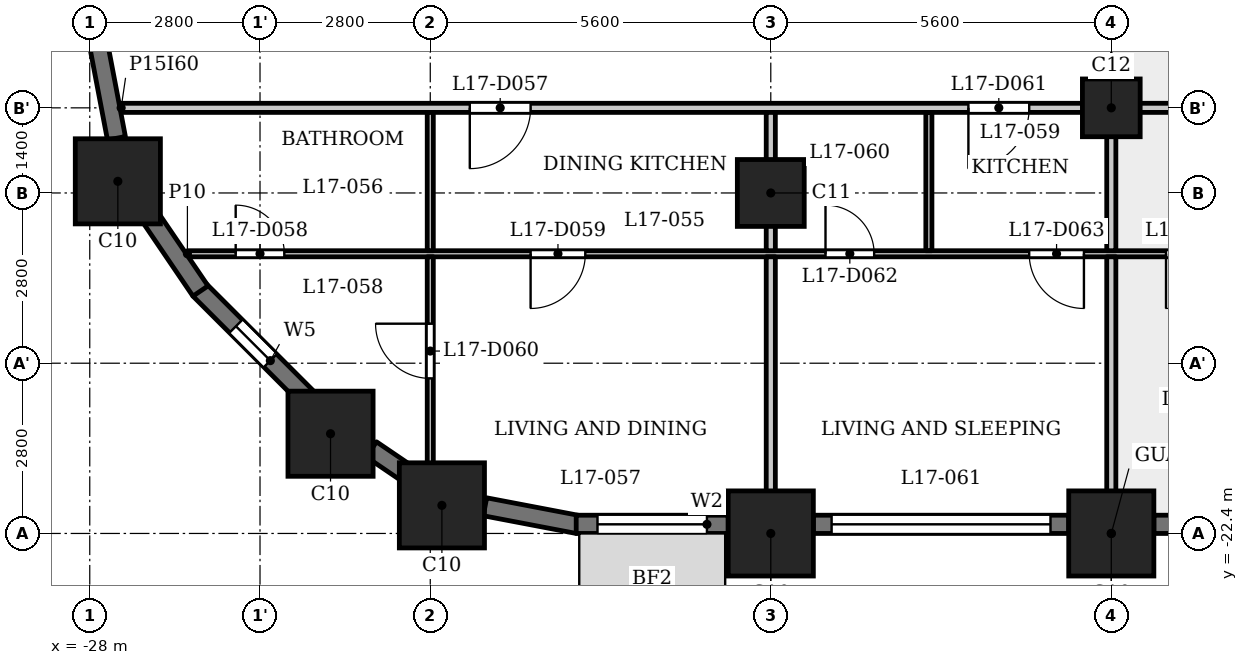
"""IFC4 building model, lengths in metres.
Left out: names, types, materials, properties, quantities, classifications, styles, units other than length and angle.
Written with IfcOpenShell. Run it as: python <this file> out.ifc"""

import sys

from ifc_helpers import new_model, si_unit, direction, frame, frame_2d, origin, origin_2d, place, context, subcontext, project, spatial, rectangle, extrude, element, fill, save


model = new_model("IFC4")
c1 = context("Model", 3, precision=1e-05, world=origin(), true_north=direction((0.0, 1.0)))
c2 = subcontext(c1, "Body", "Model", "MODEL_VIEW")
j1 = project(units=[si_unit("LENGTHUNIT", "METRE"), si_unit("PLANEANGLEUNIT", "RADIAN")], contexts=[c1])
p1 = place(None, origin())
s1 = spatial("IfcSite", under=j1, at=p1, CompositionType="ELEMENT")
p2 = place(p1, origin())
s2 = spatial("IfcBuilding", under=s1, at=p2, CompositionType="ELEMENT")
p3 = place(p2, frame((0.0, 0.0, 69.0)))
s3 = spatial("IfcBuildingStorey", under=s2, at=p3, CompositionType="ELEMENT", Elevation=69.0)
for number, where, z_axis, x_axis in (
    (1, (-22.209, -21.938, 0.0), (0.0, 0.0, 1.0), (1.0, 0.0, 0.0)),
    (2, (-16.8, -22.4, 0.0), (0.0, 0.0, 1.0), (1.0, 0.0, 0.0)),
    (3, (-11.2, -22.4, 0.0), (0.0, 0.0, 1.0), (1.0, 0.0, 0.0)),
    (4, (-27.538, -16.609, 0.0), (0.0, 0.0, 1.0), (1.0, 0.0, 0.0)),
    (5, (-24.04, -20.76, 0.0), (0.0, 0.0, 1.0), (1.0, 0.0, 0.0)),
):
    element("IfcColumn", number, at=place(p3, frame(where, z_axis=z_axis, x_axis=x_axis)), inside=s3, PredefinedType="COLUMN", context=c2, shape_type="SweptSolid", body=[
        extrude(rectangle(XDim=1.4, YDim=1.4, at=origin_2d()), origin(), (0.0, 0.0, 1.0), 3.5),
    ])
p4 = place(p3, frame((-16.8, -16.8, 0.0), z_axis=(0.0, 0.0, 1.0), x_axis=(1.0, 0.0, 0.0)))
e6 = element("IfcColumn", 6, at=p4, inside=s3, PredefinedType="COLUMN", context=c2, shape_type="SweptSolid", body=[
    extrude(rectangle(XDim=1.1, YDim=1.1, at=origin_2d()), origin(), (0.0, 0.0, 1.0), 3.5),
])
p5 = place(p3, frame((-11.2, -15.4, 0.0), z_axis=(0.0, 0.0, 1.0), x_axis=(1.0, 0.0, 0.0)))
e7 = element("IfcColumn", 7, at=p5, inside=s3, PredefinedType="COLUMN", context=c2, shape_type="SweptSolid", body=[
    extrude(rectangle(XDim=0.95, YDim=0.95, at=origin_2d()), origin(), (0.0, 0.0, 1.0), 3.5),
])
p6 = place(p3, frame((-26.197, -18.391, 0.0), z_axis=(0.0, 0.0, 1.0), x_axis=(0.707057949532, -0.707155609469, 0.0)))
e8 = element("IfcWall", 8, at=p6, inside=s3, PredefinedType="SOLIDWALL", context=c2, shape_type="SweptSolid", body=[
    extrude(rectangle(XDim=2.5, YDim=0.3, at=frame_2d((1.25, 0.0))), origin(), (0.0, 0.0, 1.0), 2.3),
])
p7 = place(p6, frame((0.85, 0.0, 0.6)))
e9 = element("IfcOpeningElement", 9, at=p7, cuts=e8, PredefinedType="OPENING", context=c2, shape_type="SweptSolid", body=[
    extrude(rectangle(XDim=0.8, YDim=1.55, at=frame_2d((0.4, 0.775))), frame((0.0, 0.16, 0.0), z_axis=(0.0, -1.0, 0.0), x_axis=(1.0, 0.0, 0.0)), (0.0, 0.0, 1.0), 0.32),
])
p8 = place(p3, frame((-23.368, -21.017, 0.0), z_axis=(0.0, 0.0, 1.0), x_axis=(0.827037530089, -0.562146710232, 0.0)))
e10 = element("IfcWall", 10, at=p8, inside=s3, PredefinedType="SOLIDWALL", context=c2, shape_type="SweptSolid", body=[
    extrude(rectangle(XDim=0.777, YDim=0.3, at=frame_2d((0.388, 0.0))), origin(), (0.0, 0.0, 1.0), 3.15),
])
p9 = place(p3, frame((-21.5, -21.961, 0.0), z_axis=(0.0, 0.0, 1.0), x_axis=(0.982297345734, -0.187328386968, 0.0)))
e11 = element("IfcWall", 11, at=p9, inside=s3, PredefinedType="SOLIDWALL", context=c2, shape_type="SweptSolid", body=[
    extrude(rectangle(XDim=1.556, YDim=0.3, at=frame_2d((0.778, 0.0))), origin(), (0.0, 0.0, 1.0), 2.3),
])
p10 = place(p3, frame((-20.0, -22.25, 0.0), z_axis=(0.0, 0.0, 1.0), x_axis=(1.0, 0.0, 0.0)))
e12 = element("IfcWall", 12, at=p10, inside=s3, PredefinedType="SOLIDWALL", context=c2, shape_type="SweptSolid", body=[
    extrude(rectangle(XDim=2.5, YDim=0.3, at=frame_2d((1.25, 0.0))), origin(), (0.0, 0.0, 1.0), 2.3),
])
p11 = place(p10, frame((0.35, 0.0, 0.9)))
e13 = element("IfcOpeningElement", 13, at=p11, cuts=e12, PredefinedType="OPENING", context=c2, shape_type="SweptSolid", body=[
    extrude(rectangle(XDim=1.8, YDim=1.25, at=frame_2d((0.9, 0.625))), frame((0.0, 0.16, 0.0), z_axis=(0.0, -1.0, 0.0), x_axis=(1.0, 0.0, 0.0)), (0.0, 0.0, 1.0), 0.32),
])
p12 = place(p3, frame((-16.1, -22.25, 0.0), z_axis=(0.0, 0.0, 1.0), x_axis=(1.0, 0.0, 0.0)))
e14 = element("IfcWall", 14, at=p12, inside=s3, PredefinedType="SOLIDWALL", context=c2, shape_type="SweptSolid", body=[
    extrude(rectangle(XDim=4.2, YDim=0.3, at=frame_2d((2.1, 0.0))), origin(), (0.0, 0.0, 1.0), 2.3),
])
p13 = place(p12, frame((0.3, 0.0, 1.2)))
e15 = element("IfcOpeningElement", 15, at=p13, cuts=e14, PredefinedType="OPENING", context=c2, shape_type="SweptSolid", body=[
    extrude(rectangle(XDim=3.6, YDim=0.95, at=frame_2d((1.8, 0.475))), frame((0.0, 0.16, 0.0), z_axis=(0.0, -1.0, 0.0), x_axis=(1.0, 0.0, 0.0)), (0.0, 0.0, 1.0), 0.32),
])
p14 = place(p3, frame((-10.5, -22.25, 0.0), z_axis=(0.0, 0.0, 1.0), x_axis=(1.0, 0.0, 0.0)))
e16 = element("IfcWall", 16, at=p14, inside=s3, PredefinedType="SOLIDWALL", context=c2, shape_type="SweptSolid", body=[
    extrude(rectangle(XDim=4.2, YDim=0.3, at=frame_2d((2.1, 0.0))), origin(), (0.0, 0.0, 1.0), 2.3),
])
p15 = place(p14, frame((0.3, 0.0, 1.2)))
e17 = element("IfcOpeningElement", 17, at=p15, cuts=e16, PredefinedType="OPENING", context=c2, shape_type="SweptSolid", body=[
    extrude(rectangle(XDim=3.6, YDim=0.95, at=frame_2d((1.8, 0.475))), frame((0.0, 0.16, 0.0), z_axis=(0.0, -1.0, 0.0), x_axis=(1.0, 0.0, 0.0)), (0.0, 0.0, 1.0), 0.32),
])
for number, where, z_axis, x_axis in (
    (18, (-27.853, -14.372, 0.0), (0.0, 0.0, 1.0), (0.187, -0.982, 0.0)),
    (19, (-27.053, -17.126, 0.0), (0.0, 0.0, 1.0), (0.562, -0.827, 0.0)),
):
    element("IfcWall", number, at=place(p3, frame(where, z_axis=z_axis, x_axis=x_axis)), inside=s3, PredefinedType="SOLIDWALL", context=c2, shape_type="SweptSolid", body=[
        extrude(rectangle(XDim=1.556, YDim=0.3, at=frame_2d((0.778, 0.0))), origin(), (0.0, 0.0, 1.0), 2.3),
    ])
p16 = place(p3, frame((-26.394, -17.8, 0.0), z_axis=(0.0, 0.0, 1.0), x_axis=(1.0, 0.0, 0.0)))
e20 = element("IfcWall", 20, at=p16, inside=s3, PredefinedType="PARTITIONING", context=c2, shape_type="SweptSolid", body=[
    extrude(rectangle(XDim=53.034, YDim=0.1, at=frame_2d((26.517, 0.0))), origin(), (0.0, 0.0, 1.0), 3.15),
])
p17 = place(p16, frame((0.794, 0.0, 0.0)))
e21 = element("IfcOpeningElement", 21, at=p17, cuts=e20, PredefinedType="OPENING", context=c2, shape_type="SweptSolid", body=[
    extrude(rectangle(XDim=0.8, YDim=2.1, at=frame_2d((0.4, 1.05))), frame((0.0, 0.06, 0.0), z_axis=(0.0, -1.0, 0.0), x_axis=(1.0, 0.0, 0.0)), (0.0, 0.0, 1.0), 0.12),
])
p18 = place(p16, frame((5.644, 0.0, 0.0)))
e22 = element("IfcOpeningElement", 22, at=p18, cuts=e20, PredefinedType="OPENING", context=c2, shape_type="SweptSolid", body=[
    extrude(rectangle(XDim=0.9, YDim=2.1, at=frame_2d((0.45, 1.05))), frame((0.0, 0.06, 0.0), z_axis=(0.0, -1.0, 0.0), x_axis=(1.0, 0.0, 0.0)), (0.0, 0.0, 1.0), 0.12),
])
p19 = place(p16, frame((10.494, 0.0, 0.0)))
e23 = element("IfcOpeningElement", 23, at=p19, cuts=e20, PredefinedType="OPENING", context=c2, shape_type="SweptSolid", body=[
    extrude(rectangle(XDim=0.8, YDim=2.1, at=frame_2d((0.4, 1.05))), frame((0.0, 0.06, 0.0), z_axis=(0.0, -1.0, 0.0), x_axis=(1.0, 0.0, 0.0)), (0.0, 0.0, 1.0), 0.12),
])
p20 = place(p16, frame((13.844, 0.0, 0.0)))
e24 = element("IfcOpeningElement", 24, at=p20, cuts=e20, PredefinedType="OPENING", context=c2, shape_type="SweptSolid", body=[
    extrude(rectangle(XDim=0.9, YDim=2.1, at=frame_2d((0.45, 1.05))), frame((0.0, 0.06, 0.0), z_axis=(0.0, -1.0, 0.0), x_axis=(1.0, 0.0, 0.0)), (0.0, 0.0, 1.0), 0.12),
])
p21 = place(p16, frame((19.344, 0.0, 0.0)))
e25 = element("IfcOpeningElement", 25, at=p21, cuts=e20, PredefinedType="OPENING", context=c2, shape_type="SweptSolid", body=[
    extrude(rectangle(XDim=0.8, YDim=2.1, at=frame_2d((0.4, 1.05))), frame((0.0, 0.06, 0.0), z_axis=(0.0, -1.0, 0.0), x_axis=(1.0, 0.0, 0.0)), (0.0, 0.0, 1.0), 0.12),
])
p22 = place(p16, frame((16.094, 0.0, 0.0)))
e26 = element("IfcOpeningElement", 26, at=p22, cuts=e20, PredefinedType="OPENING", context=c2, shape_type="SweptSolid", body=[
    extrude(rectangle(XDim=0.9, YDim=2.1, at=frame_2d((0.45, 1.05))), frame((0.0, 0.06, 0.0), z_axis=(0.0, -1.0, 0.0), x_axis=(1.0, 0.0, 0.0)), (0.0, 0.0, 1.0), 0.12),
])
p23 = place(p16, frame((24.944, 0.0, 0.0)))
e27 = element("IfcOpeningElement", 27, at=p23, cuts=e20, PredefinedType="OPENING", context=c2, shape_type="SweptSolid", body=[
    extrude(rectangle(XDim=0.8, YDim=2.1, at=frame_2d((0.4, 1.05))), frame((0.0, 0.06, 0.0), z_axis=(0.0, -1.0, 0.0), x_axis=(1.0, 0.0, 0.0)), (0.0, 0.0, 1.0), 0.12),
])
p24 = place(p16, frame((22.444, 0.0, 0.0)))
e28 = element("IfcOpeningElement", 28, at=p24, cuts=e20, PredefinedType="OPENING", context=c2, shape_type="SweptSolid", body=[
    extrude(rectangle(XDim=0.9, YDim=2.1, at=frame_2d((0.45, 1.05))), frame((0.0, 0.06, 0.0), z_axis=(0.0, -1.0, 0.0), x_axis=(1.0, 0.0, 0.0)), (0.0, 0.0, 1.0), 0.12),
])
p25 = place(p16, frame((26.944, 0.0, 0.0)))
e29 = element("IfcOpeningElement", 29, at=p25, cuts=e20, PredefinedType="OPENING", context=c2, shape_type="SweptSolid", body=[
    extrude(rectangle(XDim=0.8, YDim=2.1, at=frame_2d((0.4, 1.05))), frame((0.0, 0.06, 0.0), z_axis=(0.0, -1.0, 0.0), x_axis=(1.0, 0.0, 0.0)), (0.0, 0.0, 1.0), 0.12),
])
p26 = place(p16, frame((29.794, 0.0, 0.0)))
e30 = element("IfcOpeningElement", 30, at=p26, cuts=e20, PredefinedType="OPENING", context=c2, shape_type="SweptSolid", body=[
    extrude(rectangle(XDim=0.9, YDim=2.1, at=frame_2d((0.45, 1.05))), frame((0.0, 0.06, 0.0), z_axis=(0.0, -1.0, 0.0), x_axis=(1.0, 0.0, 0.0)), (0.0, 0.0, 1.0), 0.12),
])
p27 = place(p16, frame((33.394, 0.0, 0.0)))
e31 = element("IfcOpeningElement", 31, at=p27, cuts=e20, PredefinedType="OPENING", context=c2, shape_type="SweptSolid", body=[
    extrude(rectangle(XDim=0.9, YDim=2.1, at=frame_2d((0.45, 1.05))), frame((0.0, 0.06, 0.0), z_axis=(0.0, -1.0, 0.0), x_axis=(1.0, 0.0, 0.0)), (0.0, 0.0, 1.0), 0.12),
])
p28 = place(p16, frame((34.944, 0.0, 0.0)))
e32 = element("IfcOpeningElement", 32, at=p28, cuts=e20, PredefinedType="OPENING", context=c2, shape_type="SweptSolid", body=[
    extrude(rectangle(XDim=0.9, YDim=2.1, at=frame_2d((0.45, 1.05))), frame((0.0, 0.06, 0.0), z_axis=(0.0, -1.0, 0.0), x_axis=(1.0, 0.0, 0.0)), (0.0, 0.0, 1.0), 0.12),
])
p29 = place(p16, frame((38.144, 0.0, 0.0)))
e33 = element("IfcOpeningElement", 33, at=p29, cuts=e20, PredefinedType="OPENING", context=c2, shape_type="SweptSolid", body=[
    extrude(rectangle(XDim=0.8, YDim=2.1, at=frame_2d((0.4, 1.05))), frame((0.0, 0.06, 0.0), z_axis=(0.0, -1.0, 0.0), x_axis=(1.0, 0.0, 0.0)), (0.0, 0.0, 1.0), 0.12),
])
p30 = place(p16, frame((40.244, 0.0, 0.0)))
e34 = element("IfcOpeningElement", 34, at=p30, cuts=e20, PredefinedType="OPENING", context=c2, shape_type="SweptSolid", body=[
    extrude(rectangle(XDim=0.9, YDim=2.1, at=frame_2d((0.45, 1.05))), frame((0.0, 0.06, 0.0), z_axis=(0.0, -1.0, 0.0), x_axis=(1.0, 0.0, 0.0)), (0.0, 0.0, 1.0), 0.12),
])
p31 = place(p16, frame((49.362, 0.0, 0.0)))
e35 = element("IfcOpeningElement", 35, at=p31, cuts=e20, PredefinedType="OPENING", context=c2, shape_type="SweptSolid", body=[
    extrude(rectangle(XDim=0.8, YDim=2.1, at=frame_2d((0.4, 1.05))), frame((0.0, 0.06, 0.0), z_axis=(0.0, -1.0, 0.0), x_axis=(1.0, 0.0, 0.0)), (0.0, 0.0, 1.0), 0.12),
])
p32 = place(p16, frame((45.094, 0.0, 0.0)))
e36 = element("IfcOpeningElement", 36, at=p32, cuts=e20, PredefinedType="OPENING", context=c2, shape_type="SweptSolid", body=[
    extrude(rectangle(XDim=0.9, YDim=2.1, at=frame_2d((0.45, 1.05))), frame((0.0, 0.06, 0.0), z_axis=(0.0, -1.0, 0.0), x_axis=(1.0, 0.0, 0.0)), (0.0, 0.0, 1.0), 0.12),
])
p33 = place(p3, frame((-27.484, -15.4, 0.0), z_axis=(0.0, 0.0, 1.0), x_axis=(1.0, 0.0, 0.0)))
e37 = element("IfcWall", 37, at=p33, inside=s3, PredefinedType="PARTITIONING", context=c2, shape_type="SweptSolid", body=[
    extrude(rectangle(XDim=54.968, YDim=0.15, at=frame_2d((27.484, 0.0))), origin(), (0.0, 0.0, 1.0), 3.15),
])
p34 = place(p33, frame((5.734, 0.0, 0.0)))
e38 = element("IfcOpeningElement", 38, at=p34, cuts=e37, PredefinedType="OPENING", context=c2, shape_type="SweptSolid", body=[
    extrude(rectangle(XDim=1.0, YDim=2.1, at=frame_2d((0.5, 1.05))), frame((0.0, 0.085, 0.0), z_axis=(0.0, -1.0, 0.0), x_axis=(1.0, 0.0, 0.0)), (0.0, 0.0, 1.0), 0.17),
])
p35 = place(p33, frame((13.934, 0.0, 0.0)))
e39 = element("IfcOpeningElement", 39, at=p35, cuts=e37, PredefinedType="OPENING", context=c2, shape_type="SweptSolid", body=[
    extrude(rectangle(XDim=1.0, YDim=2.1, at=frame_2d((0.5, 1.05))), frame((0.0, 0.085, 0.0), z_axis=(0.0, -1.0, 0.0), x_axis=(1.0, 0.0, 0.0)), (0.0, 0.0, 1.0), 0.17),
])
p36 = place(p33, frame((18.184, 0.0, 0.0)))
e40 = element("IfcOpeningElement", 40, at=p36, cuts=e37, PredefinedType="OPENING", context=c2, shape_type="SweptSolid", body=[
    extrude(rectangle(XDim=1.0, YDim=2.1, at=frame_2d((0.5, 1.05))), frame((0.0, 0.085, 0.0), z_axis=(0.0, -1.0, 0.0), x_axis=(1.0, 0.0, 0.0)), (0.0, 0.0, 1.0), 0.17),
])
p37 = place(p33, frame((22.534, 0.0, 0.0)))
e41 = element("IfcOpeningElement", 41, at=p37, cuts=e37, PredefinedType="OPENING", context=c2, shape_type="SweptSolid", body=[
    extrude(rectangle(XDim=1.0, YDim=2.1, at=frame_2d((0.5, 1.05))), frame((0.0, 0.085, 0.0), z_axis=(0.0, -1.0, 0.0), x_axis=(1.0, 0.0, 0.0)), (0.0, 0.0, 1.0), 0.17),
])
p38 = place(p33, frame((36.984, 0.0, 0.0)))
e42 = element("IfcOpeningElement", 42, at=p38, cuts=e37, PredefinedType="OPENING", context=c2, shape_type="SweptSolid", body=[
    extrude(rectangle(XDim=1.0, YDim=2.1, at=frame_2d((0.5, 1.05))), frame((0.0, 0.085, 0.0), z_axis=(0.0, -1.0, 0.0), x_axis=(1.0, 0.0, 0.0)), (0.0, 0.0, 1.0), 0.17),
])
p39 = place(p33, frame((42.334, 0.0, 0.0)))
e43 = element("IfcOpeningElement", 43, at=p39, cuts=e37, PredefinedType="OPENING", context=c2, shape_type="SweptSolid", body=[
    extrude(rectangle(XDim=1.0, YDim=2.1, at=frame_2d((0.5, 1.05))), frame((0.0, 0.085, 0.0), z_axis=(0.0, -1.0, 0.0), x_axis=(1.0, 0.0, 0.0)), (0.0, 0.0, 1.0), 0.17),
])
p40 = place(p33, frame((45.184, 0.0, 0.0)))
e44 = element("IfcOpeningElement", 44, at=p40, cuts=e37, PredefinedType="OPENING", context=c2, shape_type="SweptSolid", body=[
    extrude(rectangle(XDim=1.0, YDim=2.1, at=frame_2d((0.5, 1.05))), frame((0.0, 0.085, 0.0), z_axis=(0.0, -1.0, 0.0), x_axis=(1.0, 0.0, 0.0)), (0.0, 0.0, 1.0), 0.17),
])
p41 = place(p3, frame((-22.4, -21.72, 0.0), z_axis=(0.0, 0.0, 1.0), x_axis=(0.0, 1.0, 0.0)))
e45 = element("IfcWall", 45, at=p41, inside=s3, PredefinedType="PARTITIONING", context=c2, shape_type="SweptSolid", body=[
    extrude(rectangle(XDim=3.87, YDim=0.1, at=frame_2d((1.935, 0.0))), origin(), (0.0, 0.0, 1.0), 3.15),
])
p42 = place(p41, frame((1.87, 0.0, 0.0)))
e46 = element("IfcOpeningElement", 46, at=p42, cuts=e45, PredefinedType="OPENING", context=c2, shape_type="SweptSolid", body=[
    extrude(rectangle(XDim=0.9, YDim=2.1, at=frame_2d((0.45, 1.05))), frame((0.0, 0.06, 0.0), z_axis=(0.0, -1.0, 0.0), x_axis=(1.0, 0.0, 0.0)), (0.0, 0.0, 1.0), 0.12),
])
p43 = place(p3, frame((-22.4, -17.75, 0.0), z_axis=(0.0, 0.0, 1.0), x_axis=(0.0, 1.0, 0.0)))
e47 = element("IfcWall", 47, at=p43, inside=s3, PredefinedType="PARTITIONING", context=c2, shape_type="SweptSolid", body=[
    extrude(rectangle(XDim=2.275, YDim=0.1, at=frame_2d((1.137, 0.0))), origin(), (0.0, 0.0, 1.0), 3.15),
])
p44 = place(p3, frame((-16.8, -23.08, 0.0), z_axis=(0.0, 0.0, 1.0), x_axis=(0.0, 1.0, 0.0)))
e48 = element("IfcWall", 48, at=p44, inside=s3, PredefinedType="PARTITIONING", context=c2, shape_type="SweptSolid", body=[
    extrude(rectangle(XDim=5.23, YDim=0.15, at=frame_2d((2.615, 0.0))), origin(), (0.0, 0.0, 1.0), 3.15),
])
p45 = place(p3, frame((-16.8, -17.75, 0.0), z_axis=(0.0, 0.0, 1.0), x_axis=(0.0, 1.0, 0.0)))
e49 = element("IfcWall", 49, at=p45, inside=s3, PredefinedType="PARTITIONING", context=c2, shape_type="SweptSolid", body=[
    extrude(rectangle(XDim=2.275, YDim=0.15, at=frame_2d((1.137, 0.0))), origin(), (0.0, 0.0, 1.0), 3.15),
])
p46 = place(p3, frame((-14.2, -17.75, 0.0), z_axis=(0.0, 0.0, 1.0), x_axis=(0.0, 1.0, 0.0)))
e50 = element("IfcWall", 50, at=p46, inside=s3, PredefinedType="PARTITIONING", context=c2, shape_type="SweptSolid", body=[
    extrude(rectangle(XDim=2.275, YDim=0.1, at=frame_2d((1.137, 0.0))), origin(), (0.0, 0.0, 1.0), 3.15),
])
p47 = place(p3, frame((-11.2, -23.08, 0.0), z_axis=(0.0, 0.0, 1.0), x_axis=(0.0, 1.0, 0.0)))
e51 = element("IfcWall", 51, at=p47, inside=s3, PredefinedType="PARTITIONING", context=c2, shape_type="SweptSolid", body=[
    extrude(rectangle(XDim=5.23, YDim=0.15, at=frame_2d((2.615, 0.0))), origin(), (0.0, 0.0, 1.0), 3.15),
])
p48 = place(p3, frame((-11.2, -17.75, 0.0), z_axis=(0.0, 0.0, 1.0), x_axis=(0.0, 1.0, 0.0)))
e52 = element("IfcWall", 52, at=p48, inside=s3, PredefinedType="PARTITIONING", context=c2, shape_type="SweptSolid", body=[
    extrude(rectangle(XDim=2.275, YDim=0.15, at=frame_2d((1.137, 0.0))), origin(), (0.0, 0.0, 1.0), 3.15),
])
p49 = place(p34, origin())
e53 = element("IfcDoor", 53, at=p49, inside=s3, OperationType="SINGLE_SWING_LEFT", PredefinedType="DOOR", context=c2, shape_type="SweptSolid", body=[
    extrude(rectangle(XDim=1.0, YDim=2.1, at=frame_2d((0.5, 1.05))), frame((0.0, 0.025, 0.0), z_axis=(0.0, -1.0, 0.0), x_axis=(1.0, 0.0, 0.0)), (0.0, 0.0, 1.0), 0.05),
])
fill(e38, e53)
p50 = place(p17, origin())
e54 = element("IfcDoor", 54, at=p50, inside=s3, OperationType="SINGLE_SWING_RIGHT", PredefinedType="DOOR", context=c2, shape_type="SweptSolid", body=[
    extrude(rectangle(XDim=0.8, YDim=2.1, at=frame_2d((0.4, 1.05))), frame((0.0, 0.025, 0.0), z_axis=(0.0, -1.0, 0.0), x_axis=(1.0, 0.0, 0.0)), (0.0, 0.0, 1.0), 0.05),
])
fill(e21, e54)
p51 = place(p18, origin())
e55 = element("IfcDoor", 55, at=p51, inside=s3, OperationType="SINGLE_SWING_LEFT", PredefinedType="DOOR", context=c2, shape_type="SweptSolid", body=[
    extrude(rectangle(XDim=0.9, YDim=2.1, at=frame_2d((0.45, 1.05))), frame((0.0, 0.025, 0.0), z_axis=(0.0, -1.0, 0.0), x_axis=(1.0, 0.0, 0.0)), (0.0, 0.0, 1.0), 0.05),
])
fill(e22, e55)
p52 = place(p42, origin())
e56 = element("IfcDoor", 56, at=p52, inside=s3, OperationType="SINGLE_SWING_LEFT", PredefinedType="DOOR", context=c2, shape_type="SweptSolid", body=[
    extrude(rectangle(XDim=0.9, YDim=2.1, at=frame_2d((0.45, 1.05))), frame((0.0, 0.025, 0.0), z_axis=(0.0, -1.0, 0.0), x_axis=(1.0, 0.0, 0.0)), (0.0, 0.0, 1.0), 0.05),
])
fill(e46, e56)
p53 = place(p35, origin())
e57 = element("IfcDoor", 57, at=p53, inside=s3, OperationType="SINGLE_SWING_LEFT", PredefinedType="DOOR", context=c2, shape_type="SweptSolid", body=[
    extrude(rectangle(XDim=1.0, YDim=2.1, at=frame_2d((0.5, 1.05))), frame((0.0, 0.025, 0.0), z_axis=(0.0, -1.0, 0.0), x_axis=(1.0, 0.0, 0.0)), (0.0, 0.0, 1.0), 0.05),
])
fill(e39, e57)
p54 = place(p19, origin())
e58 = element("IfcDoor", 58, at=p54, inside=s3, OperationType="SINGLE_SWING_RIGHT", PredefinedType="DOOR", context=c2, shape_type="SweptSolid", body=[
    extrude(rectangle(XDim=0.8, YDim=2.1, at=frame_2d((0.4, 1.05))), frame((0.0, 0.025, 0.0), z_axis=(0.0, -1.0, 0.0), x_axis=(1.0, 0.0, 0.0)), (0.0, 0.0, 1.0), 0.05),
])
fill(e23, e58)
p55 = place(p20, origin())
e59 = element("IfcDoor", 59, at=p55, inside=s3, OperationType="SINGLE_SWING_RIGHT", PredefinedType="DOOR", context=c2, shape_type="SweptSolid", body=[
    extrude(rectangle(XDim=0.9, YDim=2.1, at=frame_2d((0.45, 1.05))), frame((0.0, 0.025, 0.0), z_axis=(0.0, -1.0, 0.0), x_axis=(1.0, 0.0, 0.0)), (0.0, 0.0, 1.0), 0.05),
])
fill(e24, e59)
p56 = place(p22, origin())
e60 = element("IfcDoor", 60, at=p56, inside=s3, OperationType="SINGLE_SWING_LEFT", PredefinedType="DOOR", context=c2, shape_type="SweptSolid", body=[
    extrude(rectangle(XDim=0.9, YDim=2.1, at=frame_2d((0.45, 1.05))), frame((0.0, 0.025, 0.0), z_axis=(0.0, -1.0, 0.0), x_axis=(1.0, 0.0, 0.0)), (0.0, 0.0, 1.0), 0.05),
])
fill(e26, e60)
p57 = place(p7, origin())
e61 = element("IfcWindow", 61, at=p57, inside=s3, PartitioningType="SINGLE_PANEL", PredefinedType="WINDOW", context=c2, shape_type="SweptSolid", body=[
    extrude(rectangle(XDim=0.8, YDim=1.55, at=frame_2d((0.4, 0.775))), frame((0.0, 0.03, 0.0), z_axis=(0.0, -1.0, 0.0), x_axis=(1.0, 0.0, 0.0)), (0.0, 0.0, 1.0), 0.06),
])
fill(e9, e61)
p58 = place(p11, origin())
e62 = element("IfcWindow", 62, at=p58, inside=s3, PartitioningType="SINGLE_PANEL", PredefinedType="WINDOW", context=c2, shape_type="SweptSolid", body=[
    extrude(rectangle(XDim=1.8, YDim=1.25, at=frame_2d((0.9, 0.625))), frame((0.0, 0.03, 0.0), z_axis=(0.0, -1.0, 0.0), x_axis=(1.0, 0.0, 0.0)), (0.0, 0.0, 1.0), 0.06),
])
fill(e13, e62)
p59 = place(p13, origin())
e63 = element("IfcWindow", 63, at=p59, inside=s3, PartitioningType="SINGLE_PANEL", PredefinedType="WINDOW", context=c2, shape_type="SweptSolid", body=[
    extrude(rectangle(XDim=3.6, YDim=0.95, at=frame_2d((1.8, 0.475))), frame((0.0, 0.03, 0.0), z_axis=(0.0, -1.0, 0.0), x_axis=(1.0, 0.0, 0.0)), (0.0, 0.0, 1.0), 0.06),
])
fill(e15, e63)
save(model, sys.argv[1])
